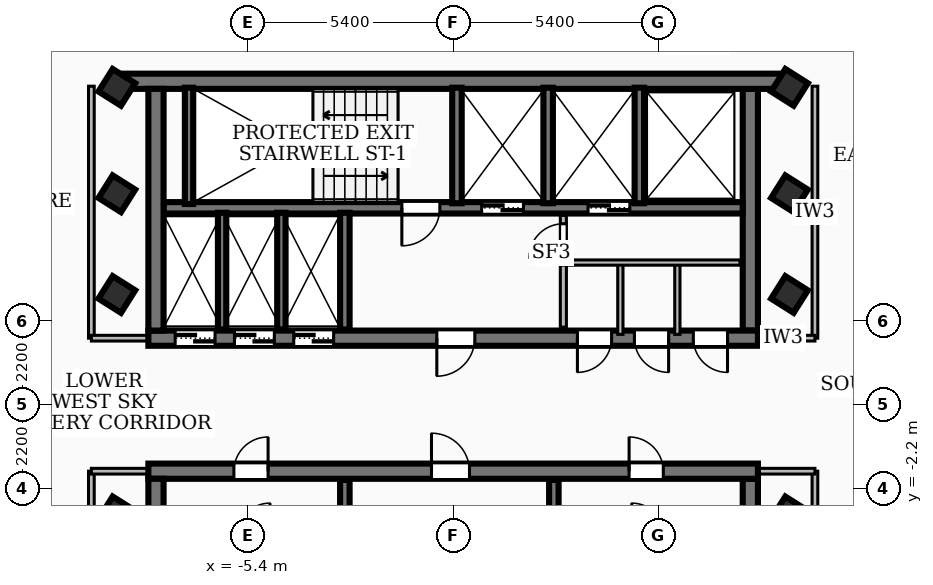
"""IFC4 building model, lengths in metres.
Left out: names, types, materials, properties, quantities, classifications, styles, units other than length and angle.
Written with IfcOpenShell. Run it as: python <this file> out.ifc"""

import sys

from ifc_helpers import new_model, si_unit, direction, frame, frame_2d, origin, origin_2d, place, context, subcontext, project, spatial, rectangle, extrude, element, fill, save


model = new_model("IFC4")
c1 = context("Model", 3, precision=1e-05, world=origin(), true_north=direction((0.0, 1.0)))
c2 = subcontext(c1, "Body", "Model", "MODEL_VIEW")
j1 = project(units=[si_unit("LENGTHUNIT", "METRE"), si_unit("PLANEANGLEUNIT", "RADIAN")], contexts=[c1])
p1 = place(None, origin())
s1 = spatial("IfcSite", under=j1, at=p1, CompositionType="ELEMENT")
p2 = place(p1, origin())
s2 = spatial("IfcBuilding", under=s1, at=p2, CompositionType="ELEMENT")
p3 = place(p2, frame((0.0, 0.0, 271.44)))
s3 = spatial("IfcBuildingStorey", under=s2, at=p3, CompositionType="ELEMENT", Elevation=271.44)
p4 = place(p3, frame((-8.78, 8.51, 0.0), z_axis=(0.0, 0.0, 1.0), x_axis=(1.0, 0.0, 0.0)))
e1 = element("IfcWall", 1, at=p4, inside=s3, PredefinedType="SHEAR", context=c2, shape_type="SweptSolid", body=[
    extrude(rectangle(XDim=17.56, YDim=0.4, at=frame_2d((8.78, 0.0))), origin(), (0.0, 0.0, 1.0), 3.16),
])
p5 = place(p3, frame((8.02, 1.75, 0.0), z_axis=(0.0, 0.0, 1.0), x_axis=(-1.0, 0.0, 0.0)))
e2 = element("IfcWall", 2, at=p5, inside=s3, PredefinedType="SHEAR", context=c2, shape_type="SweptSolid", body=[
    extrude(rectangle(XDim=16.04, YDim=0.4, at=frame_2d((8.02, 0.0))), origin(), (0.0, 0.0, 1.0), 3.16),
])
p6 = place(p5, frame((7.45, 0.0, 0.0)))
e3 = element("IfcOpeningElement", 3, at=p6, cuts=e2, PredefinedType="OPENING", context=c2, shape_type="SweptSolid", body=[
    extrude(rectangle(XDim=1.0, YDim=2.1, at=frame_2d((0.5, 1.05))), frame((0.0, 0.21, 0.0), z_axis=(0.0, -1.0, 0.0), x_axis=(1.0, 0.0, 0.0)), (0.0, 0.0, 1.0), 0.42),
])
p7 = place(p5, frame((14.285, 0.0, 0.0)))
e4 = element("IfcOpeningElement", 4, at=p7, cuts=e2, PredefinedType="OPENING", context=c2, shape_type="SweptSolid", body=[
    extrude(rectangle(XDim=1.05, YDim=2.15, at=frame_2d((0.525, 1.075))), frame((0.0, 0.21, 0.0), z_axis=(0.0, -1.0, 0.0), x_axis=(1.0, 0.0, 0.0)), (0.0, 0.0, 1.0), 0.42),
])
p8 = place(p5, frame((12.725, 0.0, 0.0)))
e5 = element("IfcOpeningElement", 5, at=p8, cuts=e2, PredefinedType="OPENING", context=c2, shape_type="SweptSolid", body=[
    extrude(rectangle(XDim=1.05, YDim=2.15, at=frame_2d((0.525, 1.075))), frame((0.0, 0.21, 0.0), z_axis=(0.0, -1.0, 0.0), x_axis=(1.0, 0.0, 0.0)), (0.0, 0.0, 1.0), 0.42),
])
p9 = place(p5, frame((11.165, 0.0, 0.0)))
e6 = element("IfcOpeningElement", 6, at=p9, cuts=e2, PredefinedType="OPENING", context=c2, shape_type="SweptSolid", body=[
    extrude(rectangle(XDim=1.05, YDim=2.15, at=frame_2d((0.525, 1.075))), frame((0.0, 0.21, 0.0), z_axis=(0.0, -1.0, 0.0), x_axis=(1.0, 0.0, 0.0)), (0.0, 0.0, 1.0), 0.42),
])
p10 = place(p5, frame((3.85, 0.0, 0.0)))
e7 = element("IfcOpeningElement", 7, at=p10, cuts=e2, PredefinedType="OPENING", context=c2, shape_type="SweptSolid", body=[
    extrude(rectangle(XDim=0.9, YDim=2.06, at=frame_2d((0.45, 1.03))), frame((0.0, 0.21, 0.0), z_axis=(0.0, -1.0, 0.0), x_axis=(1.0, 0.0, 0.0)), (0.0, 0.0, 1.0), 0.42),
])
p11 = place(p5, frame((2.35, 0.0, 0.0)))
e8 = element("IfcOpeningElement", 8, at=p11, cuts=e2, PredefinedType="OPENING", context=c2, shape_type="SweptSolid", body=[
    extrude(rectangle(XDim=0.9, YDim=2.06, at=frame_2d((0.45, 1.03))), frame((0.0, 0.21, 0.0), z_axis=(0.0, -1.0, 0.0), x_axis=(1.0, 0.0, 0.0)), (0.0, 0.0, 1.0), 0.42),
])
p12 = place(p5, frame((0.8, 0.0, 0.0)))
e9 = element("IfcOpeningElement", 9, at=p12, cuts=e2, PredefinedType="OPENING", context=c2, shape_type="SweptSolid", body=[
    extrude(rectangle(XDim=0.9, YDim=2.06, at=frame_2d((0.45, 1.03))), frame((0.0, 0.21, 0.0), z_axis=(0.0, -1.0, 0.0), x_axis=(1.0, 0.0, 0.0)), (0.0, 0.0, 1.0), 0.42),
])
for number, where, z_axis, x_axis in (
    (10, (-7.82, 1.95, 0.0), (0.0, 0.0, 1.0), (0.0, 1.0, 0.0)),
    (11, (7.82, 8.31, 0.0), (0.0, 0.0, 1.0), (0.0, -1.0, 0.0)),
):
    element("IfcWall", number, at=place(p3, frame(where, z_axis=z_axis, x_axis=x_axis)), inside=s3, PredefinedType="SHEAR", context=c2, shape_type="SweptSolid", body=[
        extrude(rectangle(XDim=6.36, YDim=0.4, at=frame_2d((3.18, 0.0))), origin(), (0.0, 0.0, 1.0), 3.16),
    ])
p13 = place(p3, frame((7.62, 5.18, 0.0), z_axis=(0.0, 0.0, 1.0), x_axis=(-1.0, 0.0, 0.0)))
e12 = element("IfcWall", 12, at=p13, inside=s3, PredefinedType="SOLIDWALL", context=c2, shape_type="SweptSolid", body=[
    extrude(rectangle(XDim=15.24, YDim=0.3, at=frame_2d((7.62, 0.0))), origin(), (0.0, 0.0, 1.0), 3.16),
])
p14 = place(p13, frame((5.77, 0.0, 0.0)))
e13 = element("IfcOpeningElement", 13, at=p14, cuts=e12, PredefinedType="OPENING", context=c2, shape_type="SweptSolid", body=[
    extrude(rectangle(XDim=1.1, YDim=2.15, at=frame_2d((0.55, 1.075))), frame((0.0, 0.16, 0.0), z_axis=(0.0, -1.0, 0.0), x_axis=(1.0, 0.0, 0.0)), (0.0, 0.0, 1.0), 0.32),
])
p15 = place(p13, frame((2.97, 0.0, 0.0)))
e14 = element("IfcOpeningElement", 14, at=p15, cuts=e12, PredefinedType="OPENING", context=c2, shape_type="SweptSolid", body=[
    extrude(rectangle(XDim=1.1, YDim=2.15, at=frame_2d((0.55, 1.075))), frame((0.0, 0.16, 0.0), z_axis=(0.0, -1.0, 0.0), x_axis=(1.0, 0.0, 0.0)), (0.0, 0.0, 1.0), 0.32),
])
p16 = place(p13, frame((7.97, 0.0, 0.0)))
e15 = element("IfcOpeningElement", 15, at=p16, cuts=e12, PredefinedType="OPENING", context=c2, shape_type="SweptSolid", body=[
    extrude(rectangle(XDim=1.0, YDim=2.1, at=frame_2d((0.5, 1.05))), frame((0.0, 0.16, 0.0), z_axis=(0.0, -1.0, 0.0), x_axis=(1.0, 0.0, 0.0)), (0.0, 0.0, 1.0), 0.32),
])
p17 = place(p3, frame((-8.02, -1.75, 0.0), z_axis=(0.0, 0.0, 1.0), x_axis=(1.0, 0.0, 0.0)))
e16 = element("IfcWall", 16, at=p17, inside=s3, PredefinedType="SHEAR", context=c2, shape_type="SweptSolid", body=[
    extrude(rectangle(XDim=16.04, YDim=0.4, at=frame_2d((8.02, 0.0))), origin(), (0.0, 0.0, 1.0), 3.16),
])
p18 = place(p17, frame((7.45, 0.0, 0.0)))
e17 = element("IfcOpeningElement", 17, at=p18, cuts=e16, PredefinedType="OPENING", context=c2, shape_type="SweptSolid", body=[
    extrude(rectangle(XDim=1.0, YDim=2.1, at=frame_2d((0.5, 1.05))), frame((0.0, 0.21, 0.0), z_axis=(0.0, -1.0, 0.0), x_axis=(1.0, 0.0, 0.0)), (0.0, 0.0, 1.0), 0.42),
])
p19 = place(p17, frame((12.65, 0.0, 0.0)))
e18 = element("IfcOpeningElement", 18, at=p19, cuts=e16, PredefinedType="OPENING", context=c2, shape_type="SweptSolid", body=[
    extrude(rectangle(XDim=0.9, YDim=2.06, at=frame_2d((0.45, 1.03))), frame((0.0, 0.21, 0.0), z_axis=(0.0, -1.0, 0.0), x_axis=(1.0, 0.0, 0.0)), (0.0, 0.0, 1.0), 0.42),
])
p20 = place(p17, frame((2.25, 0.0, 0.0)))
e19 = element("IfcOpeningElement", 19, at=p20, cuts=e16, PredefinedType="OPENING", context=c2, shape_type="SweptSolid", body=[
    extrude(rectangle(XDim=0.9, YDim=2.06, at=frame_2d((0.45, 1.03))), frame((0.0, 0.21, 0.0), z_axis=(0.0, -1.0, 0.0), x_axis=(1.0, 0.0, 0.0)), (0.0, 0.0, 1.0), 0.42),
])
for number, where, z_axis, x_axis in (
    (20, (-7.82, -8.31, 0.0), (0.0, 0.0, 1.0), (0.0, 1.0, 0.0)),
    (21, (7.82, -1.95, 0.0), (0.0, 0.0, 1.0), (0.0, -1.0, 0.0)),
):
    element("IfcWall", number, at=place(p3, frame(where, z_axis=z_axis, x_axis=x_axis)), inside=s3, PredefinedType="SHEAR", context=c2, shape_type="SweptSolid", body=[
        extrude(rectangle(XDim=6.36, YDim=0.4, at=frame_2d((3.18, 0.0))), origin(), (0.0, 0.0, 1.0), 3.16),
    ])
p21 = place(p3, frame((-6.95, 5.28, 0.0), z_axis=(0.0, 0.0, 1.0), x_axis=(0.0, 1.0, 0.0)))
e22 = element("IfcWall", 22, at=p21, inside=s3, PredefinedType="SOLIDWALL", context=c2, shape_type="SweptSolid", body=[
    extrude(rectangle(XDim=3.06, YDim=0.22, at=frame_2d((1.53, 0.0))), origin(), (0.0, 0.0, 1.0), 3.16),
])
for number, where, z_axis, x_axis in (
    (23, (0.1, 5.3, 0.0), (0.0, 0.0, 1.0), (0.0, 1.0, 0.0)),
    (24, (2.5, 5.3, 0.0), (0.0, 0.0, 1.0), (0.0, 1.0, 0.0)),
    (25, (4.9, 5.3, 0.0), (0.0, 0.0, 1.0), (0.0, 1.0, 0.0)),
):
    element("IfcWall", number, at=place(p3, frame(where, z_axis=z_axis, x_axis=x_axis)), inside=s3, PredefinedType="SOLIDWALL", context=c2, shape_type="SweptSolid", body=[
        extrude(rectangle(XDim=3.04, YDim=0.25, at=frame_2d((1.52, 0.0))), origin(), (0.0, 0.0, 1.0), 3.16),
    ])
for number, where, z_axis, x_axis in (
    (26, (-2.85, 1.98, 0.0), (0.0, 0.0, 1.0), (0.0, 1.0, 0.0)),
    (27, (-2.85, -5.05, 0.0), (0.0, 0.0, 1.0), (0.0, 1.0, 0.0)),
    (28, (2.65, -5.05, 0.0), (0.0, 0.0, 1.0), (0.0, 1.0, 0.0)),
):
    element("IfcWall", number, at=place(p3, frame(where, z_axis=z_axis, x_axis=x_axis)), inside=s3, PredefinedType="SOLIDWALL", context=c2, shape_type="SweptSolid", body=[
        extrude(rectangle(XDim=3.07, YDim=0.25, at=frame_2d((1.535, 0.0))), origin(), (0.0, 0.0, 1.0), 3.16),
    ])
for number, where, z_axis, x_axis in (
    (29, (-6.08, 1.98, 0.0), (0.0, 0.0, 1.0), (0.0, 1.0, 0.0)),
    (30, (-4.52, 1.98, 0.0), (0.0, 0.0, 1.0), (0.0, 1.0, 0.0)),
):
    element("IfcWall", number, at=place(p3, frame(where, z_axis=z_axis, x_axis=x_axis)), inside=s3, PredefinedType="SOLIDWALL", context=c2, shape_type="SweptSolid", body=[
        extrude(rectangle(XDim=3.07, YDim=0.22, at=frame_2d((1.535, 0.0))), origin(), (0.0, 0.0, 1.0), 3.16),
    ])
for number, where, z_axis, x_axis in (
    (31, (-8.85, -2.9, 0.0), (0.0, 0.0, 1.0), (0.534, 0.845, 0.0)),
    (32, (-8.85, 2.9, 0.0), (0.0, 0.0, 1.0), (0.534, 0.845, 0.0)),
    (33, (-8.85, 5.55, 0.0), (0.0, 0.0, 1.0), (0.534, 0.845, 0.0)),
    (34, (8.85, -2.9, 0.0), (0.0, 0.0, 1.0), (0.534, 0.845, 0.0)),
    (35, (8.85, 2.9, 0.0), (0.0, 0.0, 1.0), (0.534, 0.845, 0.0)),
    (36, (8.85, 5.55, 0.0), (0.0, 0.0, 1.0), (0.534, 0.845, 0.0)),
    (37, (-8.85, 8.35, 0.0), (0.0, 0.0, 1.0), (0.534, 0.845, 0.0)),
    (38, (8.85, 8.35, 0.0), (0.0, 0.0, 1.0), (0.534, 0.845, 0.0)),
):
    element("IfcColumn", number, at=place(p3, frame(where, z_axis=z_axis, x_axis=x_axis)), inside=s3, PredefinedType="COLUMN", context=c2, shape_type="SweptSolid", body=[
        extrude(rectangle(XDim=0.7, YDim=0.7, at=origin_2d()), origin(), (0.0, 0.0, 1.0), 3.42),
    ])
p22 = place(p3, frame((2.9, 2.04, 0.0), z_axis=(0.0, 0.0, 1.0), x_axis=(0.0, 1.0, 0.0)))
e39 = element("IfcWall", 39, at=p22, inside=s3, PredefinedType="PARTITIONING", context=c2, shape_type="SweptSolid", body=[
    extrude(rectangle(XDim=2.94, YDim=0.16, at=frame_2d((1.47, 0.0))), origin(), (0.0, 0.0, 1.0), 2.39),
])
p23 = place(p22, frame((1.82, 0.0, 0.0)))
e40 = element("IfcOpeningElement", 40, at=p23, cuts=e39, PredefinedType="OPENING", context=c2, shape_type="SweptSolid", body=[
    extrude(rectangle(XDim=0.9, YDim=2.06, at=frame_2d((0.45, 1.03))), frame((0.0, 0.09, 0.0), z_axis=(0.0, -1.0, 0.0), x_axis=(1.0, 0.0, 0.0)), (0.0, 0.0, 1.0), 0.18),
])
p24 = place(p3, frame((2.9, 3.74, 0.0), z_axis=(0.0, 0.0, 1.0), x_axis=(1.0, 0.0, 0.0)))
e41 = element("IfcWall", 41, at=p24, inside=s3, PredefinedType="PARTITIONING", context=c2, shape_type="SweptSolid", body=[
    extrude(rectangle(XDim=4.65, YDim=0.138, at=frame_2d((2.325, 0.0))), origin(), (0.0, 0.0, 1.0), 3.16),
])
for number, where, z_axis, x_axis in (
    (42, (4.4, 1.85, 0.0), (0.0, 0.0, 1.0), (0.0, 1.0, 0.0)),
    (43, (5.9, 1.85, 0.0), (0.0, 0.0, 1.0), (0.0, 1.0, 0.0)),
):
    element("IfcWall", number, at=place(p3, frame(where, z_axis=z_axis, x_axis=x_axis)), inside=s3, PredefinedType="PARTITIONING", context=c2, shape_type="SweptSolid", body=[
        extrude(rectangle(XDim=1.89, YDim=0.138, at=frame_2d((0.945, 0.0))), origin(), (0.0, 0.0, 1.0), 2.39),
    ])
p25 = place(p3, frame((-9.52, 1.75, 0.0), z_axis=(0.0, 0.0, 1.0), x_axis=(0.0, 1.0, 0.0)))
e44 = element("IfcWall", 44, at=p25, inside=s3, PredefinedType="PARTITIONING", context=c2, shape_type="SweptSolid", body=[
    extrude(rectangle(XDim=6.63, YDim=0.15, at=frame_2d((3.315, 0.0))), origin(), (0.0, 0.0, 1.0), 2.53),
])
p26 = place(p3, frame((-7.85, 1.75, 0.0), z_axis=(0.0, 0.0, 1.0), x_axis=(-1.0, 0.0, 0.0)))
e45 = element("IfcWall", 45, at=p26, inside=s3, PredefinedType="PARTITIONING", context=c2, shape_type="SweptSolid", body=[
    extrude(rectangle(XDim=1.67, YDim=0.15, at=frame_2d((0.835, 0.0))), origin(), (0.0, 0.0, 1.0), 2.39),
])
p27 = place(p3, frame((-9.52, -8.38, 0.0), z_axis=(0.0, 0.0, 1.0), x_axis=(0.0, 1.0, 0.0)))
e46 = element("IfcWall", 46, at=p27, inside=s3, PredefinedType="PARTITIONING", context=c2, shape_type="SweptSolid", body=[
    extrude(rectangle(XDim=6.63, YDim=0.15, at=frame_2d((3.315, 0.0))), origin(), (0.0, 0.0, 1.0), 3.16),
])
p28 = place(p3, frame((-7.85, -1.75, 0.0), z_axis=(0.0, 0.0, 1.0), x_axis=(-1.0, 0.0, 0.0)))
e47 = element("IfcWall", 47, at=p28, inside=s3, PredefinedType="PARTITIONING", context=c2, shape_type="SweptSolid", body=[
    extrude(rectangle(XDim=1.67, YDim=0.15, at=frame_2d((0.835, 0.0))), origin(), (0.0, 0.0, 1.0), 2.39),
])
p29 = place(p3, frame((9.52, 1.75, 0.0), z_axis=(0.0, 0.0, 1.0), x_axis=(0.0, 1.0, 0.0)))
e48 = element("IfcWall", 48, at=p29, inside=s3, PredefinedType="PARTITIONING", context=c2, shape_type="SweptSolid", body=[
    extrude(rectangle(XDim=6.63, YDim=0.15, at=frame_2d((3.315, 0.0))), origin(), (0.0, 0.0, 1.0), 3.16),
])
p30 = place(p3, frame((7.85, 1.75, 0.0), z_axis=(0.0, 0.0, 1.0), x_axis=(1.0, 0.0, 0.0)))
e49 = element("IfcWall", 49, at=p30, inside=s3, PredefinedType="PARTITIONING", context=c2, shape_type="SweptSolid", body=[
    extrude(rectangle(XDim=1.67, YDim=0.15, at=frame_2d((0.835, 0.0))), origin(), (0.0, 0.0, 1.0), 2.39),
])
p31 = place(p3, frame((9.52, -8.38, 0.0), z_axis=(0.0, 0.0, 1.0), x_axis=(0.0, 1.0, 0.0)))
e50 = element("IfcWall", 50, at=p31, inside=s3, PredefinedType="PARTITIONING", context=c2, shape_type="SweptSolid", body=[
    extrude(rectangle(XDim=6.63, YDim=0.15, at=frame_2d((3.315, 0.0))), origin(), (0.0, 0.0, 1.0), 2.53),
])
p32 = place(p3, frame((7.85, -1.75, 0.0), z_axis=(0.0, 0.0, 1.0), x_axis=(1.0, 0.0, 0.0)))
e51 = element("IfcWall", 51, at=p32, inside=s3, PredefinedType="PARTITIONING", context=c2, shape_type="SweptSolid", body=[
    extrude(rectangle(XDim=1.67, YDim=0.15, at=frame_2d((0.835, 0.0))), origin(), (0.0, 0.0, 1.0), 2.39),
])
p33 = place(p3, frame((15.512, 7.104, 0.0), z_axis=(0.0, 0.0, 1.0), x_axis=(-0.845450958208, 0.534053065963, 0.0)))
e52 = element("IfcWall", 52, at=p33, inside=s3, PredefinedType="PARTITIONING", context=c2, shape_type="SweptSolid", body=[
    extrude(rectangle(XDim=7.951, YDim=0.1, at=frame_2d((3.975, 0.0))), origin(), (0.0, 0.0, 1.0), 2.53),
])
p34 = place(p3, frame((-17.646, -1.178, 0.0), z_axis=(0.0, 0.0, 1.0), x_axis=(0.534052309352, 0.845451436143, 0.0)))
e53 = element("IfcWall", 53, at=p34, inside=s3, PredefinedType="PARTITIONING", context=c2, shape_type="SweptSolid", body=[
    extrude(rectangle(XDim=20.44, YDim=0.1, at=frame_2d((10.22, 0.0))), origin(), (0.0, 0.0, 1.0), 2.53),
])
p35 = place(p34, frame((11.259, 0.0, 0.0)))
e54 = element("IfcOpeningElement", 54, at=p35, cuts=e53, PredefinedType="OPENING", context=c2, shape_type="SweptSolid", body=[
    extrude(rectangle(XDim=0.86, YDim=2.04, at=frame_2d((0.43, 1.02))), frame((0.0, 0.06, 0.0), z_axis=(0.0, -1.0, 0.0), x_axis=(1.0, 0.0, 0.0)), (0.0, 0.0, 1.0), 0.12),
])
p36 = place(p34, frame((9.819, 0.0, 0.0)))
e55 = element("IfcOpeningElement", 55, at=p36, cuts=e53, PredefinedType="OPENING", context=c2, shape_type="SweptSolid", body=[
    extrude(rectangle(XDim=0.86, YDim=2.04, at=frame_2d((0.43, 1.02))), frame((0.0, 0.06, 0.0), z_axis=(0.0, -1.0, 0.0), x_axis=(1.0, 0.0, 0.0)), (0.0, 0.0, 1.0), 0.12),
])
p37 = place(p3, frame((17.646, 1.178, 0.0), z_axis=(0.0, 0.0, 1.0), x_axis=(-0.534052309352, -0.845451436143, 0.0)))
e56 = element("IfcWall", 56, at=p37, inside=s3, PredefinedType="PARTITIONING", context=c2, shape_type="SweptSolid", body=[
    extrude(rectangle(XDim=20.44, YDim=0.1, at=frame_2d((10.22, 0.0))), origin(), (0.0, 0.0, 1.0), 2.53),
])
p38 = place(p37, frame((10.159, 0.0, 0.0)))
e57 = element("IfcOpeningElement", 57, at=p38, cuts=e56, PredefinedType="OPENING", context=c2, shape_type="SweptSolid", body=[
    extrude(rectangle(XDim=0.86, YDim=2.04, at=frame_2d((0.43, 1.02))), frame((0.0, 0.06, 0.0), z_axis=(0.0, -1.0, 0.0), x_axis=(1.0, 0.0, 0.0)), (0.0, 0.0, 1.0), 0.12),
])
p39 = place(p37, frame((8.719, 0.0, 0.0)))
e58 = element("IfcOpeningElement", 58, at=p39, cuts=e56, PredefinedType="OPENING", context=c2, shape_type="SweptSolid", body=[
    extrude(rectangle(XDim=0.86, YDim=2.04, at=frame_2d((0.43, 1.02))), frame((0.0, 0.06, 0.0), z_axis=(0.0, -1.0, 0.0), x_axis=(1.0, 0.0, 0.0)), (0.0, 0.0, 1.0), 0.12),
])
p40 = place(p6, origin())
e59 = element("IfcDoor", 59, at=p40, inside=s3, OperationType="SINGLE_SWING_RIGHT", PredefinedType="DOOR", context=c2, shape_type="SweptSolid", body=[
    extrude(rectangle(XDim=1.0, YDim=2.1, at=frame_2d((0.5, 1.05))), frame((0.0, 0.025, 0.0), z_axis=(0.0, -1.0, 0.0), x_axis=(1.0, 0.0, 0.0)), (0.0, 0.0, 1.0), 0.05),
])
fill(e3, e59)
p41 = place(p18, origin())
e60 = element("IfcDoor", 60, at=p41, inside=s3, OperationType="SINGLE_SWING_LEFT", PredefinedType="DOOR", context=c2, shape_type="SweptSolid", body=[
    extrude(rectangle(XDim=1.0, YDim=2.1, at=frame_2d((0.5, 1.05))), frame((0.0, 0.025, 0.0), z_axis=(0.0, -1.0, 0.0), x_axis=(1.0, 0.0, 0.0)), (0.0, 0.0, 1.0), 0.05),
])
fill(e17, e60)
p42 = place(p14, origin())
e61 = element("IfcDoor", 61, at=p42, inside=s3, OperationType="DOUBLE_DOOR_SLIDING", PredefinedType="DOOR", context=c2, shape_type="SweptSolid", body=[
    extrude(rectangle(XDim=1.1, YDim=2.15, at=frame_2d((0.55, 1.075))), frame((0.0, 0.025, 0.0), z_axis=(0.0, -1.0, 0.0), x_axis=(1.0, 0.0, 0.0)), (0.0, 0.0, 1.0), 0.05),
])
fill(e13, e61)
p43 = place(p15, origin())
e62 = element("IfcDoor", 62, at=p43, inside=s3, OperationType="DOUBLE_DOOR_SLIDING", PredefinedType="DOOR", context=c2, shape_type="SweptSolid", body=[
    extrude(rectangle(XDim=1.1, YDim=2.15, at=frame_2d((0.55, 1.075))), frame((0.0, 0.025, 0.0), z_axis=(0.0, -1.0, 0.0), x_axis=(1.0, 0.0, 0.0)), (0.0, 0.0, 1.0), 0.05),
])
fill(e14, e62)
p44 = place(p16, origin())
e63 = element("IfcDoor", 63, at=p44, inside=s3, OperationType="SINGLE_SWING_RIGHT", PredefinedType="DOOR", context=c2, shape_type="SweptSolid", body=[
    extrude(rectangle(XDim=1.0, YDim=2.1, at=frame_2d((0.5, 1.05))), frame((0.0, 0.025, 0.0), z_axis=(0.0, -1.0, 0.0), x_axis=(1.0, 0.0, 0.0)), (0.0, 0.0, 1.0), 0.05),
])
fill(e15, e63)
p45 = place(p7, origin())
e64 = element("IfcDoor", 64, at=p45, inside=s3, OperationType="DOUBLE_DOOR_SLIDING", PredefinedType="DOOR", context=c2, shape_type="SweptSolid", body=[
    extrude(rectangle(XDim=1.05, YDim=2.15, at=frame_2d((0.525, 1.075))), frame((0.0, 0.025, 0.0), z_axis=(0.0, -1.0, 0.0), x_axis=(1.0, 0.0, 0.0)), (0.0, 0.0, 1.0), 0.05),
])
fill(e4, e64)
p46 = place(p8, origin())
e65 = element("IfcDoor", 65, at=p46, inside=s3, OperationType="DOUBLE_DOOR_SLIDING", PredefinedType="DOOR", context=c2, shape_type="SweptSolid", body=[
    extrude(rectangle(XDim=1.05, YDim=2.15, at=frame_2d((0.525, 1.075))), frame((0.0, 0.025, 0.0), z_axis=(0.0, -1.0, 0.0), x_axis=(1.0, 0.0, 0.0)), (0.0, 0.0, 1.0), 0.05),
])
fill(e5, e65)
p47 = place(p9, origin())
e66 = element("IfcDoor", 66, at=p47, inside=s3, OperationType="DOUBLE_DOOR_SLIDING", PredefinedType="DOOR", context=c2, shape_type="SweptSolid", body=[
    extrude(rectangle(XDim=1.05, YDim=2.15, at=frame_2d((0.525, 1.075))), frame((0.0, 0.025, 0.0), z_axis=(0.0, -1.0, 0.0), x_axis=(1.0, 0.0, 0.0)), (0.0, 0.0, 1.0), 0.05),
])
fill(e6, e66)
p48 = place(p19, origin())
e67 = element("IfcDoor", 67, at=p48, inside=s3, OperationType="SINGLE_SWING_LEFT", PredefinedType="DOOR", context=c2, shape_type="SweptSolid", body=[
    extrude(rectangle(XDim=0.9, YDim=2.06, at=frame_2d((0.45, 1.03))), frame((0.0, 0.025, 0.0), z_axis=(0.0, -1.0, 0.0), x_axis=(1.0, 0.0, 0.0)), (0.0, 0.0, 1.0), 0.05),
])
fill(e18, e67)
p49 = place(p20, origin())
e68 = element("IfcDoor", 68, at=p49, inside=s3, OperationType="SINGLE_SWING_RIGHT", PredefinedType="DOOR", context=c2, shape_type="SweptSolid", body=[
    extrude(rectangle(XDim=0.9, YDim=2.06, at=frame_2d((0.45, 1.03))), frame((0.0, 0.025, 0.0), z_axis=(0.0, -1.0, 0.0), x_axis=(1.0, 0.0, 0.0)), (0.0, 0.0, 1.0), 0.05),
])
fill(e19, e68)
p50 = place(p10, origin())
e69 = element("IfcDoor", 69, at=p50, inside=s3, OperationType="SINGLE_SWING_RIGHT", PredefinedType="DOOR", context=c2, shape_type="SweptSolid", body=[
    extrude(rectangle(XDim=0.9, YDim=2.06, at=frame_2d((0.45, 1.03))), frame((0.0, 0.025, 0.0), z_axis=(0.0, -1.0, 0.0), x_axis=(1.0, 0.0, 0.0)), (0.0, 0.0, 1.0), 0.05),
])
fill(e7, e69)
p51 = place(p11, origin())
e70 = element("IfcDoor", 70, at=p51, inside=s3, OperationType="SINGLE_SWING_LEFT", PredefinedType="DOOR", context=c2, shape_type="SweptSolid", body=[
    extrude(rectangle(XDim=0.9, YDim=2.06, at=frame_2d((0.45, 1.03))), frame((0.0, 0.025, 0.0), z_axis=(0.0, -1.0, 0.0), x_axis=(1.0, 0.0, 0.0)), (0.0, 0.0, 1.0), 0.05),
])
fill(e8, e70)
p52 = place(p12, origin())
e71 = element("IfcDoor", 71, at=p52, inside=s3, OperationType="SINGLE_SWING_LEFT", PredefinedType="DOOR", context=c2, shape_type="SweptSolid", body=[
    extrude(rectangle(XDim=0.9, YDim=2.06, at=frame_2d((0.45, 1.03))), frame((0.0, 0.025, 0.0), z_axis=(0.0, -1.0, 0.0), x_axis=(1.0, 0.0, 0.0)), (0.0, 0.0, 1.0), 0.05),
])
fill(e9, e71)
p53 = place(p23, origin())
e72 = element("IfcDoor", 72, at=p53, inside=s3, OperationType="SINGLE_SWING_LEFT", PredefinedType="DOOR", context=c2, shape_type="SweptSolid", body=[
    extrude(rectangle(XDim=0.9, YDim=2.06, at=frame_2d((0.45, 1.03))), frame((0.0, 0.025, 0.0), z_axis=(0.0, -1.0, 0.0), x_axis=(1.0, 0.0, 0.0)), (0.0, 0.0, 1.0), 0.05),
])
fill(e40, e72)
save(model, sys.argv[1])
